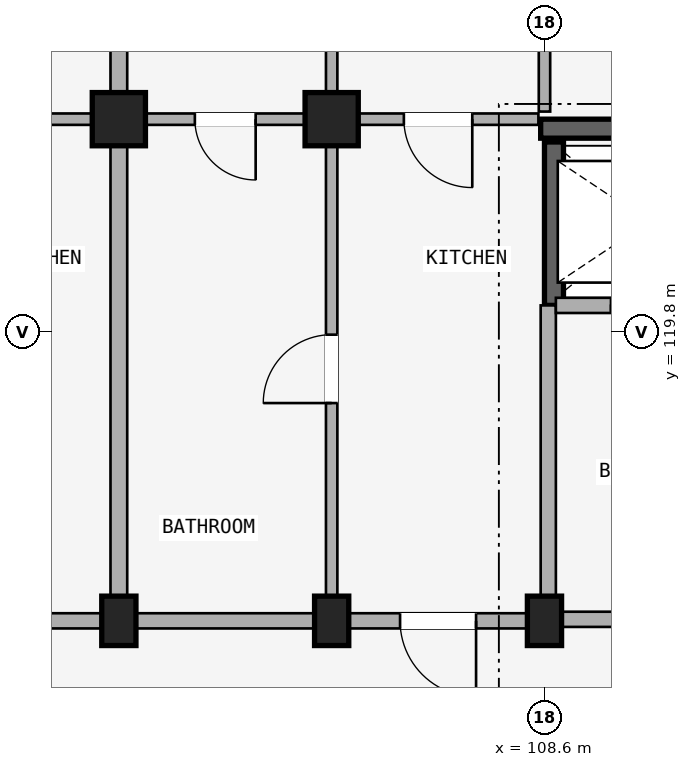
"""IFC4 building model, lengths in metres.
Left out: names, types, materials, properties, quantities, classifications, styles, units other than length and angle.
Written with IfcOpenShell. Run it as: python <this file> out.ifc"""

import sys

from ifc_helpers import new_model, si_unit, direction, frame, frame_2d, origin, origin_2d, place, context, subcontext, project, spatial, rectangle, extrude, element, fill, save


model = new_model("IFC4")
c1 = context("Model", 3, precision=1e-05, world=origin(), true_north=direction((0.0, 1.0)))
c2 = subcontext(c1, "Body", "Model", "MODEL_VIEW")
j1 = project(units=[si_unit("LENGTHUNIT", "METRE"), si_unit("PLANEANGLEUNIT", "RADIAN")], contexts=[c1])
p1 = place(None, origin())
s1 = spatial("IfcSite", under=j1, at=p1, CompositionType="ELEMENT")
p2 = place(p1, origin())
s2 = spatial("IfcBuilding", under=s1, at=p2, CompositionType="ELEMENT")
p3 = place(p2, frame((0.0, 0.0, 27.6)))
s3 = spatial("IfcBuildingStorey", under=s2, at=p3, CompositionType="ELEMENT", Elevation=27.6)
p4 = place(p3, frame((111.35, 122.475, 0.0), z_axis=(0.0, 0.0, 1.0), x_axis=(-1.0, 0.0, 0.0)))
e1 = element("IfcWall", 1, at=p4, inside=s3, PredefinedType="SHEAR", context=c2, shape_type="SweptSolid", body=[
    extrude(rectangle(XDim=2.8, YDim=0.25, at=frame_2d((1.4, 0.0))), origin(), (0.0, 0.0, 1.0), 2.93),
])
p5 = place(p3, frame((108.725, 120.15, 0.0), z_axis=(0.0, 0.0, 1.0), x_axis=(0.0, 1.0, 0.0)))
e2 = element("IfcWall", 2, at=p5, inside=s3, PredefinedType="SHEAR", context=c2, shape_type="SweptSolid", body=[
    extrude(rectangle(XDim=2.15, YDim=0.25, at=frame_2d((1.075, 0.0))), origin(), (0.0, 0.0, 1.0), 2.93),
])
for number, where, z_axis, x_axis in (
    (3, (108.6, 116.0, 0.0), (0.0, 0.0, 1.0), (1.0, 0.0, 0.0)),
    (4, (105.8, 116.0, 0.0), (0.0, 0.0, 1.0), (1.0, 0.0, 0.0)),
):
    element("IfcColumn", number, at=place(p3, frame(where, z_axis=z_axis, x_axis=x_axis)), inside=s3, PredefinedType="COLUMN", context=c2, shape_type="SweptSolid", body=[
        extrude(rectangle(XDim=0.45, YDim=0.65, at=origin_2d()), origin(), (0.0, 0.0, 1.0), 2.93),
    ])
p6 = place(p3, frame((105.8, 122.6, 0.0), z_axis=(0.0, 0.0, 1.0), x_axis=(1.0, 0.0, 0.0)))
e5 = element("IfcColumn", 5, at=p6, inside=s3, PredefinedType="COLUMN", context=c2, shape_type="SweptSolid", body=[
    extrude(rectangle(XDim=0.7, YDim=0.7, at=origin_2d()), origin(), (0.0, 0.0, 1.0), 2.93),
])
p7 = place(p3, frame((103.0, 116.0, 0.0), z_axis=(0.0, 0.0, 1.0), x_axis=(1.0, 0.0, 0.0)))
e6 = element("IfcColumn", 6, at=p7, inside=s3, PredefinedType="COLUMN", context=c2, shape_type="SweptSolid", body=[
    extrude(rectangle(XDim=0.45, YDim=0.65, at=origin_2d()), origin(), (0.0, 0.0, 1.0), 2.93),
])
p8 = place(p3, frame((103.0, 122.6, 0.0), z_axis=(0.0, 0.0, 1.0), x_axis=(1.0, 0.0, 0.0)))
e7 = element("IfcColumn", 7, at=p8, inside=s3, PredefinedType="COLUMN", context=c2, shape_type="SweptSolid", body=[
    extrude(rectangle(XDim=0.7, YDim=0.7, at=origin_2d()), origin(), (0.0, 0.0, 1.0), 2.93),
])
p9 = place(p3, frame((114.3, 116.02, 0.0), z_axis=(0.0, 0.0, 1.0), x_axis=(-1.0, 0.0, 0.0)))
e8 = element("IfcWall", 8, at=p9, inside=s3, PredefinedType="STANDARD", context=c2, shape_type="SweptSolid", body=[
    extrude(rectangle(XDim=5.65, YDim=0.2, at=frame_2d((2.825, 0.0))), origin(), (0.0, 0.0, 1.0), 2.372),
])
p10 = place(p9, frame((1.923, 0.0, 0.0)))
e9 = element("IfcOpeningElement", 9, at=p10, cuts=e8, PredefinedType="OPENING", context=c2, shape_type="SweptSolid", body=[
    extrude(rectangle(XDim=1.24, YDim=2.15, at=frame_2d((0.62, 1.075))), frame((0.0, 0.11, 0.0), z_axis=(0.0, -1.0, 0.0), x_axis=(1.0, 0.0, 0.0)), (0.0, 0.0, 1.0), 0.22),
])
p11 = place(p3, frame((108.65, 116.02, 0.0), z_axis=(0.0, 0.0, 1.0), x_axis=(0.0, 1.0, 0.0)))
e10 = element("IfcWall", 10, at=p11, inside=s3, PredefinedType="STANDARD", context=c2, shape_type="SweptSolid", body=[
    extrude(rectangle(XDim=4.13, YDim=0.2, at=frame_2d((2.065, 0.0))), origin(), (0.0, 0.0, 1.0), 2.372),
])
p12 = place(p3, frame((111.3, 120.15, 0.0), z_axis=(0.0, 0.0, 1.0), x_axis=(-1.0, 0.0, 0.0)))
e11 = element("IfcWall", 11, at=p12, inside=s3, PredefinedType="STANDARD", context=c2, shape_type="SweptSolid", body=[
    extrude(rectangle(XDim=2.55, YDim=0.2, at=frame_2d((1.275, 0.0))), origin(), (0.0, 0.0, 1.0), 2.372),
])
p13 = place(p12, frame((0.725, 0.0, 0.0)))
e12 = element("IfcOpeningElement", 12, at=p13, cuts=e11, PredefinedType="OPENING", context=c2, shape_type="SweptSolid", body=[
    extrude(rectangle(XDim=1.1, YDim=2.15, at=frame_2d((0.55, 1.075))), frame((0.0, 0.11, 0.0), z_axis=(0.0, -1.0, 0.0), x_axis=(1.0, 0.0, 0.0)), (0.0, 0.0, 1.0), 0.22),
])
p14 = place(p3, frame((108.6, 116.0, 0.0), z_axis=(0.0, 0.0, 1.0), x_axis=(-1.0, 0.0, 0.0)))
e13 = element("IfcWall", 13, at=p14, inside=s3, PredefinedType="STANDARD", context=c2, shape_type="SweptSolid", body=[
    extrude(rectangle(XDim=2.8, YDim=0.2, at=frame_2d((1.4, 0.0))), origin(), (0.0, 0.0, 1.0), 2.372),
])
p15 = place(p14, frame((0.9, 0.0, 0.0)))
e14 = element("IfcOpeningElement", 14, at=p15, cuts=e13, PredefinedType="OPENING", context=c2, shape_type="SweptSolid", body=[
    extrude(rectangle(XDim=1.0, YDim=2.15, at=frame_2d((0.5, 1.075))), frame((0.0, 0.11, 0.0), z_axis=(0.0, -1.0, 0.0), x_axis=(1.0, 0.0, 0.0)), (0.0, 0.0, 1.0), 0.22),
])
p16 = place(p3, frame((108.52, 122.6, 0.0), z_axis=(0.0, 0.0, 1.0), x_axis=(-1.0, 0.0, 0.0)))
e15 = element("IfcWall", 15, at=p16, inside=s3, PredefinedType="PLUMBINGWALL", context=c2, shape_type="SweptSolid", body=[
    extrude(rectangle(XDim=2.64, YDim=0.15, at=frame_2d((1.32, 0.0))), origin(), (0.0, 0.0, 1.0), 2.372),
])
p17 = place(p16, frame((0.87, 0.0, 0.0)))
e16 = element("IfcOpeningElement", 16, at=p17, cuts=e15, PredefinedType="OPENING", context=c2, shape_type="SweptSolid", body=[
    extrude(rectangle(XDim=0.9, YDim=2.1, at=frame_2d((0.45, 1.05))), frame((0.0, 0.085, 0.0), z_axis=(0.0, -1.0, 0.0), x_axis=(1.0, 0.0, 0.0)), (0.0, 0.0, 1.0), 0.17),
])
p18 = place(p3, frame((105.8, 116.0, 0.0), z_axis=(0.0, 0.0, 1.0), x_axis=(-1.0, 0.0, 0.0)))
e17 = element("IfcWall", 17, at=p18, inside=s3, PredefinedType="STANDARD", context=c2, shape_type="SweptSolid", body=[
    extrude(rectangle(XDim=2.8, YDim=0.2, at=frame_2d((1.4, 0.0))), origin(), (0.0, 0.0, 1.0), 2.372),
])
p19 = place(p3, frame((105.72, 122.6, 0.0), z_axis=(0.0, 0.0, 1.0), x_axis=(-1.0, 0.0, 0.0)))
e18 = element("IfcWall", 18, at=p19, inside=s3, PredefinedType="PLUMBINGWALL", context=c2, shape_type="SweptSolid", body=[
    extrude(rectangle(XDim=2.64, YDim=0.15, at=frame_2d((1.32, 0.0))), origin(), (0.0, 0.0, 1.0), 2.372),
])
p20 = place(p19, frame((0.92, 0.0, 0.0)))
e19 = element("IfcOpeningElement", 19, at=p20, cuts=e18, PredefinedType="OPENING", context=c2, shape_type="SweptSolid", body=[
    extrude(rectangle(XDim=0.8, YDim=2.1, at=frame_2d((0.4, 1.05))), frame((0.0, 0.085, 0.0), z_axis=(0.0, -1.0, 0.0), x_axis=(1.0, 0.0, 0.0)), (0.0, 0.0, 1.0), 0.17),
])
p21 = place(p3, frame((103.0, 116.0, 0.0), z_axis=(0.0, 0.0, 1.0), x_axis=(-1.0, 0.0, 0.0)))
e20 = element("IfcWall", 20, at=p21, inside=s3, PredefinedType="STANDARD", context=c2, shape_type="SweptSolid", body=[
    extrude(rectangle(XDim=2.8, YDim=0.2, at=frame_2d((1.4, 0.0))), origin(), (0.0, 0.0, 1.0), 2.372),
])
p22 = place(p21, frame((0.9, 0.0, 0.0)))
e21 = element("IfcOpeningElement", 21, at=p22, cuts=e20, PredefinedType="OPENING", context=c2, shape_type="SweptSolid", body=[
    extrude(rectangle(XDim=1.0, YDim=2.15, at=frame_2d((0.5, 1.075))), frame((0.0, 0.11, 0.0), z_axis=(0.0, -1.0, 0.0), x_axis=(1.0, 0.0, 0.0)), (0.0, 0.0, 1.0), 0.22),
])
p23 = place(p3, frame((102.92, 122.6, 0.0), z_axis=(0.0, 0.0, 1.0), x_axis=(-1.0, 0.0, 0.0)))
e22 = element("IfcWall", 22, at=p23, inside=s3, PredefinedType="PLUMBINGWALL", context=c2, shape_type="SweptSolid", body=[
    extrude(rectangle(XDim=2.64, YDim=0.15, at=frame_2d((1.32, 0.0))), origin(), (0.0, 0.0, 1.0), 2.372),
])
p24 = place(p23, frame((0.87, 0.0, 0.0)))
e23 = element("IfcOpeningElement", 23, at=p24, cuts=e22, PredefinedType="OPENING", context=c2, shape_type="SweptSolid", body=[
    extrude(rectangle(XDim=0.9, YDim=2.1, at=frame_2d((0.45, 1.05))), frame((0.0, 0.085, 0.0), z_axis=(0.0, -1.0, 0.0), x_axis=(1.0, 0.0, 0.0)), (0.0, 0.0, 1.0), 0.17),
])
p25 = place(p3, frame((108.6, 122.7, 0.0), z_axis=(0.0, 0.0, 1.0), x_axis=(0.0, 1.0, 0.0)))
e24 = element("IfcWall", 24, at=p25, inside=s3, PredefinedType="PARTITIONING", context=c2, shape_type="SweptSolid", body=[
    extrude(rectangle(XDim=10.82, YDim=0.15, at=frame_2d((5.41, 0.0))), origin(), (0.0, 0.0, 1.0), 2.372),
])
p26 = place(p25, frame((0.899, 0.0, 0.0)))
e25 = element("IfcOpeningElement", 25, at=p26, cuts=e24, PredefinedType="OPENING", context=c2, shape_type="SweptSolid", body=[
    extrude(rectangle(XDim=0.8, YDim=2.1, at=frame_2d((0.4, 1.05))), frame((0.0, 0.085, 0.0), z_axis=(0.0, -1.0, 0.0), x_axis=(1.0, 0.0, 0.0)), (0.0, 0.0, 1.0), 0.17),
])
p27 = place(p3, frame((105.8, 116.05, 0.0), z_axis=(0.0, 0.0, 1.0), x_axis=(0.0, 1.0, 0.0)))
e26 = element("IfcWall", 26, at=p27, inside=s3, PredefinedType="PARTITIONING", context=c2, shape_type="SweptSolid", body=[
    extrude(rectangle(XDim=6.53, YDim=0.15, at=frame_2d((3.265, 0.0))), origin(), (0.0, 0.0, 1.0), 2.372),
])
p28 = place(p27, frame((2.815, 0.0, 0.0)))
e27 = element("IfcOpeningElement", 27, at=p28, cuts=e26, PredefinedType="OPENING", context=c2, shape_type="SweptSolid", body=[
    extrude(rectangle(XDim=0.9, YDim=2.1, at=frame_2d((0.45, 1.05))), frame((0.0, 0.085, 0.0), z_axis=(0.0, -1.0, 0.0), x_axis=(1.0, 0.0, 0.0)), (0.0, 0.0, 1.0), 0.17),
])
p29 = place(p3, frame((105.8, 122.7, 0.0), z_axis=(0.0, 0.0, 1.0), x_axis=(0.0, 1.0, 0.0)))
e28 = element("IfcWall", 28, at=p29, inside=s3, PredefinedType="PARTITIONING", context=c2, shape_type="SweptSolid", body=[
    extrude(rectangle(XDim=10.82, YDim=0.15, at=frame_2d((5.41, 0.0))), origin(), (0.0, 0.0, 1.0), 2.372),
])
p30 = place(p29, frame((0.899, 0.0, 0.0)))
e29 = element("IfcOpeningElement", 29, at=p30, cuts=e28, PredefinedType="OPENING", context=c2, shape_type="SweptSolid", body=[
    extrude(rectangle(XDim=0.8, YDim=2.1, at=frame_2d((0.4, 1.05))), frame((0.0, 0.085, 0.0), z_axis=(0.0, -1.0, 0.0), x_axis=(1.0, 0.0, 0.0)), (0.0, 0.0, 1.0), 0.17),
])
p31 = place(p3, frame((103.0, 116.05, 0.0), z_axis=(0.0, 0.0, 1.0), x_axis=(0.0, 1.0, 0.0)))
e30 = element("IfcWall", 30, at=p31, inside=s3, PredefinedType="STANDARD", context=c2, shape_type="SweptSolid", body=[
    extrude(rectangle(XDim=6.53, YDim=0.22, at=frame_2d((3.265, 0.0))), origin(), (0.0, 0.0, 1.0), 2.372),
])
p32 = place(p3, frame((103.0, 122.7, 0.0), z_axis=(0.0, 0.0, 1.0), x_axis=(0.0, 1.0, 0.0)))
e31 = element("IfcWall", 31, at=p32, inside=s3, PredefinedType="STANDARD", context=c2, shape_type="SweptSolid", body=[
    extrude(rectangle(XDim=10.82, YDim=0.22, at=frame_2d((5.41, 0.0))), origin(), (0.0, 0.0, 1.0), 2.372),
])
p33 = place(p13, origin())
e32 = element("IfcDoor", 32, at=p33, inside=s3, OperationType="SLIDING_TO_LEFT", PredefinedType="DOOR", context=c2, shape_type="SweptSolid", body=[
    extrude(rectangle(XDim=1.1, YDim=2.15, at=frame_2d((0.55, 1.075))), frame((0.0, 0.025, 0.0), z_axis=(0.0, -1.0, 0.0), x_axis=(1.0, 0.0, 0.0)), (0.0, 0.0, 1.0), 0.05),
])
fill(e12, e32)
p34 = place(p17, frame((0.9, 0.0, 0.0), z_axis=(0.0, 0.0, 1.0), x_axis=(-1.0, 0.0, 0.0)))
e33 = element("IfcDoor", 33, at=p34, inside=s3, OperationType="SINGLE_SWING_RIGHT", PredefinedType="DOOR", context=c2, shape_type="SweptSolid", body=[
    extrude(rectangle(XDim=0.9, YDim=2.1, at=frame_2d((0.45, 1.05))), frame((0.0, 0.025, 0.0), z_axis=(0.0, -1.0, 0.0), x_axis=(1.0, 0.0, 0.0)), (0.0, 0.0, 1.0), 0.05),
])
fill(e16, e33)
p35 = place(p15, origin())
e34 = element("IfcDoor", 34, at=p35, inside=s3, OperationType="SINGLE_SWING_LEFT", PredefinedType="DOOR", context=c2, shape_type="SweptSolid", body=[
    extrude(rectangle(XDim=1.0, YDim=2.15, at=frame_2d((0.5, 1.075))), frame((0.0, 0.025, 0.0), z_axis=(0.0, -1.0, 0.0), x_axis=(1.0, 0.0, 0.0)), (0.0, 0.0, 1.0), 0.05),
])
fill(e14, e34)
p36 = place(p20, frame((0.8, 0.0, 0.0), z_axis=(0.0, 0.0, 1.0), x_axis=(-1.0, 0.0, 0.0)))
e35 = element("IfcDoor", 35, at=p36, inside=s3, OperationType="SINGLE_SWING_RIGHT", PredefinedType="DOOR", context=c2, shape_type="SweptSolid", body=[
    extrude(rectangle(XDim=0.8, YDim=2.1, at=frame_2d((0.4, 1.05))), frame((0.0, 0.025, 0.0), z_axis=(0.0, -1.0, 0.0), x_axis=(1.0, 0.0, 0.0)), (0.0, 0.0, 1.0), 0.05),
])
fill(e19, e35)
p37 = place(p28, origin())
e36 = element("IfcDoor", 36, at=p37, inside=s3, OperationType="SINGLE_SWING_LEFT", PredefinedType="DOOR", context=c2, shape_type="SweptSolid", body=[
    extrude(rectangle(XDim=0.9, YDim=2.1, at=frame_2d((0.45, 1.05))), frame((0.0, 0.025, 0.0), z_axis=(0.0, -1.0, 0.0), x_axis=(1.0, 0.0, 0.0)), (0.0, 0.0, 1.0), 0.05),
])
fill(e27, e36)
save(model, sys.argv[1])
